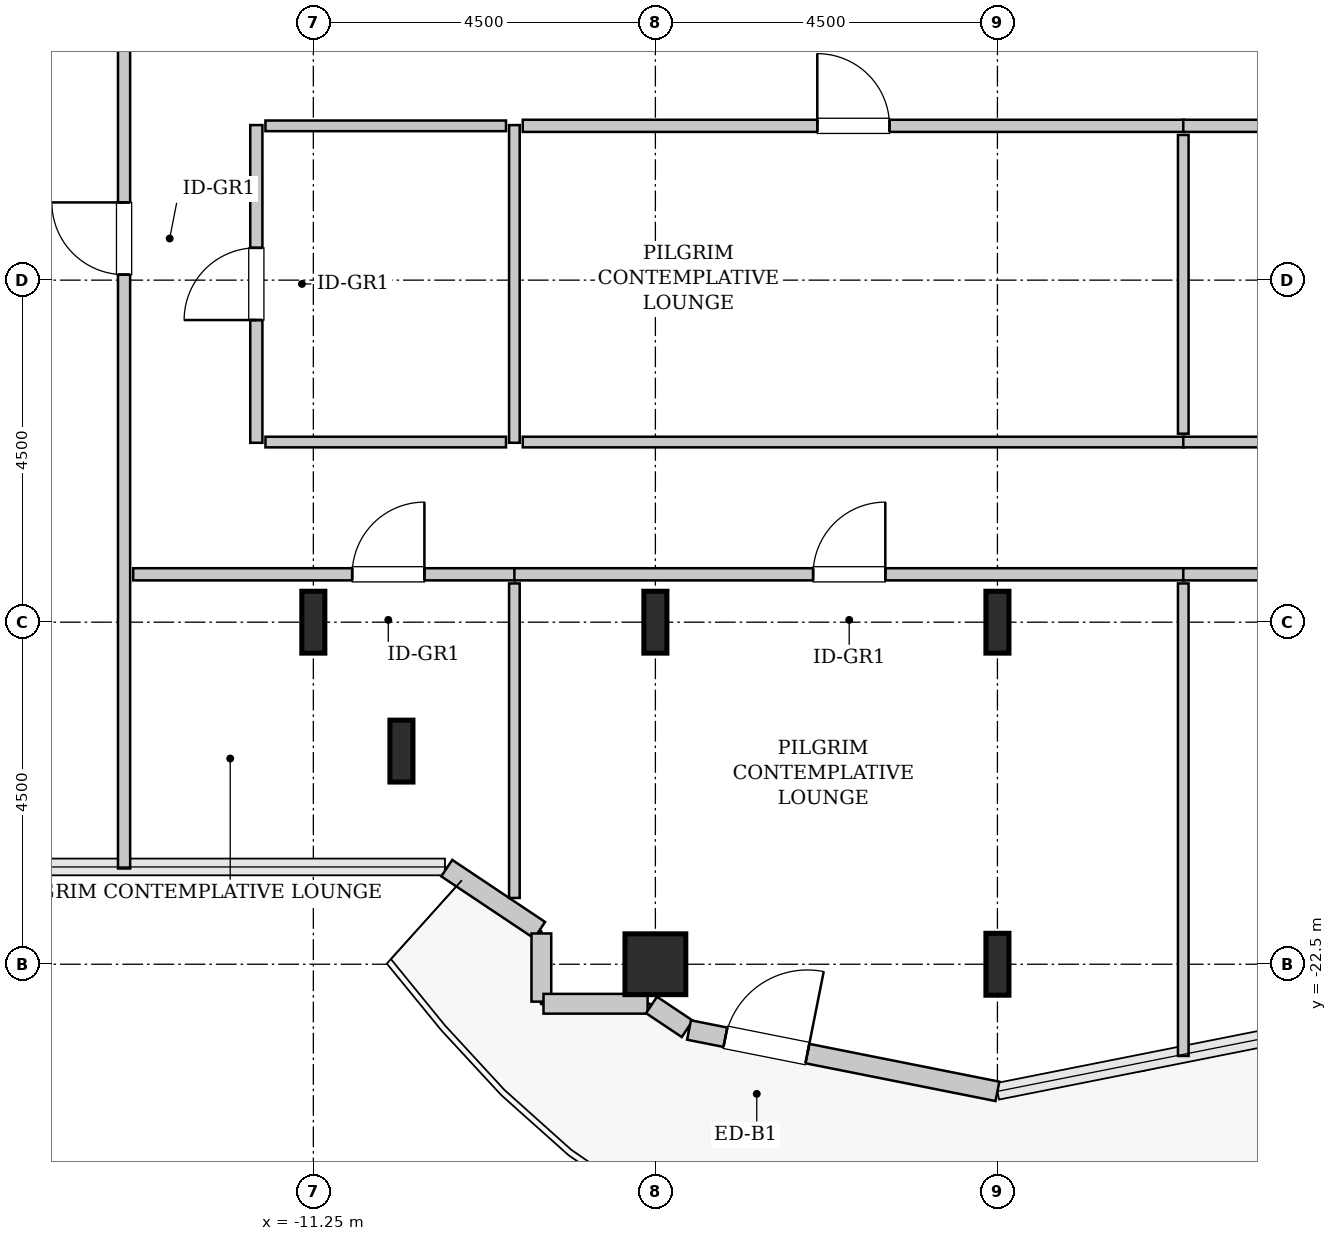
"""IFC4 building model, lengths in metres.
Left out: names, types, materials, properties, quantities, classifications, styles, units other than length and angle.
Written with IfcOpenShell. Run it as: python <this file> out.ifc"""

import sys

from ifc_helpers import new_model, si_unit, direction, frame, frame_2d, origin, origin_2d, place, context, subcontext, project, spatial, rectangle, hollow_rectangle, i_section, extrude, source, transform, mapped, element, fill, save


model = new_model("IFC4")
c1 = context("Model", 3, precision=1e-05, world=origin(), true_north=direction((0.0, 1.0)))
c2 = subcontext(c1, "Body", "Model", "MODEL_VIEW")
j1 = project(units=[si_unit("LENGTHUNIT", "METRE"), si_unit("PLANEANGLEUNIT", "RADIAN")], contexts=[c1])
p1 = place(None, origin())
s1 = spatial("IfcSite", under=j1, at=p1, CompositionType="ELEMENT")
p2 = place(p1, origin())
s2 = spatial("IfcBuilding", under=s1, at=p2, CompositionType="ELEMENT")
p3 = place(p2, frame((0.0, 0.0, 164.0)))
s3 = spatial("IfcBuildingStorey", under=s2, at=p3, CompositionType="ELEMENT", Elevation=164.0)
m1 = source(origin(), c2, "Body", "SweptSolid", [
    extrude(i_section(OverallWidth=0.303, OverallDepth=0.814, WebThickness=0.021, FlangeThickness=0.04, FilletRadius=0.03, at=origin_2d()), origin(), (0.0, 0.0, 1.0), 3.8),
])
for number, where, z_axis, x_axis in (
    (1, (-11.25, -18.0, 0.0), (0.0, 0.0, 1.0), (1.0, 0.0, 0.0)),
    (2, (-10.091, -19.696, 0.0), (0.0, 0.0, 1.0), (1.0, 0.0, 0.0)),
):
    element("IfcColumn", number, at=place(p3, frame(where, z_axis=z_axis, x_axis=x_axis)), inside=s3, PredefinedType="COLUMN", context=c2, shape_type="MappedRepresentation", body=[
        mapped(m1, transform((0.0, 0.0, 0.0), x_axis=(1.0, 0.0, 0.0), y_axis=(0.0, 1.0, 0.0), z_axis=(0.0, 0.0, 1.0), scale=1.0)),
    ])
m2 = source(origin(), c2, "Body", "SweptSolid", [
    extrude(hollow_rectangle(XDim=0.8, YDim=0.8, WallThickness=0.04, InnerFilletRadius=0.04, OuterFilletRadius=0.08, at=origin_2d()), origin(), (0.0, 0.0, 1.0), 3.8),
])
p4 = place(p3, frame((-6.75, -22.5, 0.0), z_axis=(0.0, 0.0, 1.0), x_axis=(1.0, 0.0, 0.0)))
e3 = element("IfcColumn", 3, at=p4, inside=s3, PredefinedType="COLUMN", context=c2, shape_type="MappedRepresentation", body=[
    mapped(m2, transform((0.0, 0.0, 0.0), x_axis=(1.0, 0.0, 0.0), y_axis=(0.0, 1.0, 0.0), z_axis=(0.0, 0.0, 1.0), scale=1.0)),
])
for number, where, z_axis, x_axis in (
    (4, (-6.75, -18.0, 0.0), (0.0, 0.0, 1.0), (1.0, 0.0, 0.0)),
    (5, (-2.25, -22.5, 0.0), (0.0, 0.0, 1.0), (1.0, 0.0, 0.0)),
    (6, (-2.25, -18.0, 0.0), (0.0, 0.0, 1.0), (1.0, 0.0, 0.0)),
):
    element("IfcColumn", number, at=place(p3, frame(where, z_axis=z_axis, x_axis=x_axis)), inside=s3, PredefinedType="COLUMN", context=c2, shape_type="MappedRepresentation", body=[
        mapped(m1, transform((0.0, 0.0, 0.0), x_axis=(1.0, 0.0, 0.0), y_axis=(0.0, 1.0, 0.0), z_axis=(0.0, 0.0, 1.0), scale=1.0)),
    ])
m3 = source(origin(), c2, "Body", "SweptSolid", [
    extrude(rectangle(XDim=1.469, YDim=0.26, at=frame_2d((0.734, 0.0))), origin(), (0.0, 0.0, 1.0), 3.55),
])
p5 = place(p3, frame((-9.495, -21.236, 0.0), z_axis=(0.0, 0.0, 1.0), x_axis=(0.831461760506, -0.555581983884, 0.0)))
e7 = element("IfcWall", 7, at=p5, inside=s3, PredefinedType="SOLIDWALL", context=c2, shape_type="MappedRepresentation", body=[
    mapped(m3, transform((0.0, 0.0, 0.0), x_axis=(1.0, 0.0, 0.0), y_axis=(0.0, 1.0, 0.0), z_axis=(0.0, 0.0, 1.0), scale=1.0)),
])
m4 = source(origin(), c2, "Body", "SweptSolid", [
    extrude(rectangle(XDim=0.897, YDim=0.26, at=frame_2d((0.448, 0.0))), origin(), (0.0, 0.0, 1.0), 3.55),
])
p6 = place(p3, frame((-8.25, -22.095, 0.0), z_axis=(0.0, 0.0, 1.0), x_axis=(0.0, -1.0, 0.0)))
e8 = element("IfcWall", 8, at=p6, inside=s3, PredefinedType="SOLIDWALL", context=c2, shape_type="MappedRepresentation", body=[
    mapped(m4, transform((0.0, 0.0, 0.0), x_axis=(1.0, 0.0, 0.0), y_axis=(0.0, 1.0, 0.0), z_axis=(0.0, 0.0, 1.0), scale=1.0)),
])
m5 = source(origin(), c2, "Body", "SweptSolid", [
    extrude(rectangle(XDim=1.37, YDim=0.26, at=frame_2d((0.685, 0.0))), origin(), (0.0, 0.0, 1.0), 3.55),
])
p7 = place(p3, frame((-8.222, -23.02, 0.0), z_axis=(0.0, 0.0, 1.0), x_axis=(1.0, 0.0, 0.0)))
e9 = element("IfcWall", 9, at=p7, inside=s3, PredefinedType="SOLIDWALL", context=c2, shape_type="MappedRepresentation", body=[
    mapped(m5, transform((0.0, 0.0, 0.0), x_axis=(1.0, 0.0, 0.0), y_axis=(0.0, 1.0, 0.0), z_axis=(0.0, 0.0, 1.0), scale=1.0)),
])
m6 = source(origin(), c2, "Body", "SweptSolid", [
    extrude(rectangle(XDim=0.565, YDim=0.26, at=frame_2d((0.283, 0.0))), origin(), (0.0, 0.0, 1.0), 3.55),
])
p8 = place(p3, frame((-6.801, -23.036, 0.0), z_axis=(0.0, 0.0, 1.0), x_axis=(0.831651492666, -0.555297933317, 0.0)))
e10 = element("IfcWall", 10, at=p8, inside=s3, PredefinedType="SOLIDWALL", context=c2, shape_type="MappedRepresentation", body=[
    mapped(m6, transform((0.0, 0.0, 0.0), x_axis=(1.0, 0.0, 0.0), y_axis=(0.0, 1.0, 0.0), z_axis=(0.0, 0.0, 1.0), scale=1.0)),
])
m7 = source(origin(), c2, "Body", "SweptSolid", [
    extrude(rectangle(XDim=4.137, YDim=0.26, at=frame_2d((2.068, 0.0))), origin(), (0.0, 0.0, 1.0), 3.55),
])
p9 = place(p3, frame((-6.307, -23.365, 0.0), z_axis=(0.0, 0.0, 1.0), x_axis=(0.980782170794, -0.195105954428, 0.0)))
e11 = element("IfcWall", 11, at=p9, inside=s3, PredefinedType="SOLIDWALL", context=c2, shape_type="MappedRepresentation", body=[
    mapped(m7, transform((0.0, 0.0, 0.0), x_axis=(1.0, 0.0, 0.0), y_axis=(0.0, 1.0, 0.0), z_axis=(0.0, 0.0, 1.0), scale=1.0)),
])
p10 = place(p9, frame((0.488, 0.0, 0.0)))
e12 = element("IfcOpeningElement", 12, at=p10, cuts=e11, PredefinedType="OPENING", context=c2, shape_type="SweptSolid", body=[
    extrude(rectangle(XDim=1.1, YDim=2.2, at=frame_2d((0.55, 1.1))), frame((0.0, 0.14, 0.0), z_axis=(0.0, -1.0, 0.0), x_axis=(1.0, 0.0, 0.0)), (0.0, 0.0, 1.0), 0.28),
])
m8 = source(origin(), c2, "Body", "SweptSolid", [
    extrude(rectangle(XDim=12.745, YDim=0.16, at=frame_2d((6.373, 0.0))), origin(), (0.0, 0.0, 1.0), 3.535),
])
p11 = place(p3, frame((-13.74, -21.24, 0.0), z_axis=(0.0, 0.0, 1.0), x_axis=(0.0, 1.0, 0.0)))
e13 = element("IfcWall", 13, at=p11, inside=s3, PredefinedType="PARTITIONING", context=c2, shape_type="MappedRepresentation", body=[
    mapped(m8, transform((0.0, 0.0, 0.0), x_axis=(1.0, 0.0, 0.0), y_axis=(0.0, 1.0, 0.0), z_axis=(0.0, 0.0, 1.0), scale=1.0)),
])
p12 = place(p11, frame((7.812, 0.0, 0.0)))
e14 = element("IfcOpeningElement", 14, at=p12, cuts=e13, PredefinedType="OPENING", context=c2, shape_type="SweptSolid", body=[
    extrude(rectangle(XDim=0.95, YDim=2.1, at=frame_2d((0.475, 1.05))), frame((0.0, 0.09, 0.0), z_axis=(0.0, -1.0, 0.0), x_axis=(1.0, 0.0, 0.0)), (0.0, 0.0, 1.0), 0.18),
])
m9 = source(origin(), c2, "Body", "SweptSolid", [
    extrude(rectangle(XDim=5.025, YDim=0.16, at=frame_2d((2.513, 0.0))), origin(), (0.0, 0.0, 1.0), 3.535),
])
p13 = place(p3, frame((-13.62, -17.37, 0.0), z_axis=(0.0, 0.0, 1.0), x_axis=(1.0, 0.0, 0.0)))
e15 = element("IfcWall", 15, at=p13, inside=s3, PredefinedType="PARTITIONING", context=c2, shape_type="MappedRepresentation", body=[
    mapped(m9, transform((0.0, 0.0, 0.0), x_axis=(1.0, 0.0, 0.0), y_axis=(0.0, 1.0, 0.0), z_axis=(0.0, 0.0, 1.0), scale=1.0)),
])
p14 = place(p13, frame((2.881, 0.0, 0.0)))
e16 = element("IfcOpeningElement", 16, at=p14, cuts=e15, PredefinedType="OPENING", context=c2, shape_type="SweptSolid", body=[
    extrude(rectangle(XDim=0.95, YDim=2.1, at=frame_2d((0.475, 1.05))), frame((0.0, 0.09, 0.0), z_axis=(0.0, -1.0, 0.0), x_axis=(1.0, 0.0, 0.0)), (0.0, 0.0, 1.0), 0.18),
])
m10 = source(origin(), c2, "Body", "SweptSolid", [
    extrude(rectangle(XDim=4.138, YDim=0.14, at=frame_2d((2.069, 0.0))), origin(), (0.0, 0.0, 1.0), 3.535),
])
p15 = place(p3, frame((-8.605, -21.628, 0.0), z_axis=(0.0, 0.0, 1.0), x_axis=(0.0, 1.0, 0.0)))
e17 = element("IfcWall", 17, at=p15, inside=s3, PredefinedType="PARTITIONING", context=c2, shape_type="MappedRepresentation", body=[
    mapped(m10, transform((0.0, 0.0, 0.0), x_axis=(1.0, 0.0, 0.0), y_axis=(0.0, 1.0, 0.0), z_axis=(0.0, 0.0, 1.0), scale=1.0)),
])
m11 = source(origin(), c2, "Body", "SweptSolid", [
    extrude(rectangle(XDim=4.18, YDim=0.16, at=frame_2d((2.09, 0.0))), origin(), (0.0, 0.0, 1.0), 3.535),
])
p16 = place(p3, frame((-12.0, -15.64, 0.0), z_axis=(0.0, 0.0, 1.0), x_axis=(0.0, 1.0, 0.0)))
e18 = element("IfcWall", 18, at=p16, inside=s3, PredefinedType="PARTITIONING", context=c2, shape_type="MappedRepresentation", body=[
    mapped(m11, transform((0.0, 0.0, 0.0), x_axis=(1.0, 0.0, 0.0), y_axis=(0.0, 1.0, 0.0), z_axis=(0.0, 0.0, 1.0), scale=1.0)),
])
p17 = place(p16, frame((1.615, 0.0, 0.0)))
e19 = element("IfcOpeningElement", 19, at=p17, cuts=e18, PredefinedType="OPENING", context=c2, shape_type="SweptSolid", body=[
    extrude(rectangle(XDim=0.95, YDim=2.1, at=frame_2d((0.475, 1.05))), frame((0.0, 0.09, 0.0), z_axis=(0.0, -1.0, 0.0), x_axis=(1.0, 0.0, 0.0)), (0.0, 0.0, 1.0), 0.18),
])
m12 = source(origin(), c2, "Body", "SweptSolid", [
    extrude(rectangle(XDim=4.18, YDim=0.14, at=frame_2d((2.09, 0.0))), origin(), (0.0, 0.0, 1.0), 3.535),
])
p18 = place(p3, frame((-8.605, -15.64, 0.0), z_axis=(0.0, 0.0, 1.0), x_axis=(0.0, 1.0, 0.0)))
e20 = element("IfcWall", 20, at=p18, inside=s3, PredefinedType="PARTITIONING", context=c2, shape_type="MappedRepresentation", body=[
    mapped(m12, transform((0.0, 0.0, 0.0), x_axis=(1.0, 0.0, 0.0), y_axis=(0.0, 1.0, 0.0), z_axis=(0.0, 0.0, 1.0), scale=1.0)),
])
m13 = source(origin(), c2, "Body", "SweptSolid", [
    extrude(rectangle(XDim=3.165, YDim=0.14, at=frame_2d((1.583, 0.0))), origin(), (0.0, 0.0, 1.0), 3.535),
])
for number, where, z_axis, x_axis in (
    (21, (-11.88, -11.47, 0.0), (0.0, 0.0, 1.0), (1.0, 0.0, 0.0)),
    (22, (-11.88, -15.63, 0.0), (0.0, 0.0, 1.0), (1.0, 0.0, 0.0)),
):
    element("IfcWall", number, at=place(p3, frame(where, z_axis=z_axis, x_axis=x_axis)), inside=s3, PredefinedType="PARTITIONING", context=c2, shape_type="MappedRepresentation", body=[
        mapped(m13, transform((0.0, 0.0, 0.0), x_axis=(1.0, 0.0, 0.0), y_axis=(0.0, 1.0, 0.0), z_axis=(0.0, 0.0, 1.0), scale=1.0)),
    ])
m14 = source(origin(), c2, "Body", "SweptSolid", [
    extrude(rectangle(XDim=8.81, YDim=0.16, at=frame_2d((4.405, 0.0))), origin(), (0.0, 0.0, 1.0), 3.535),
])
p19 = place(p3, frame((-8.605, -17.37, 0.0), z_axis=(0.0, 0.0, 1.0), x_axis=(1.0, 0.0, 0.0)))
e23 = element("IfcWall", 23, at=p19, inside=s3, PredefinedType="PARTITIONING", context=c2, shape_type="MappedRepresentation", body=[
    mapped(m14, transform((0.0, 0.0, 0.0), x_axis=(1.0, 0.0, 0.0), y_axis=(0.0, 1.0, 0.0), z_axis=(0.0, 0.0, 1.0), scale=1.0)),
])
p20 = place(p19, frame((3.93, 0.0, 0.0)))
e24 = element("IfcOpeningElement", 24, at=p20, cuts=e23, PredefinedType="OPENING", context=c2, shape_type="SweptSolid", body=[
    extrude(rectangle(XDim=0.95, YDim=2.1, at=frame_2d((0.475, 1.05))), frame((0.0, 0.09, 0.0), z_axis=(0.0, -1.0, 0.0), x_axis=(1.0, 0.0, 0.0)), (0.0, 0.0, 1.0), 0.18),
])
m15 = source(origin(), c2, "Body", "SweptSolid", [
    extrude(rectangle(XDim=6.216, YDim=0.14, at=frame_2d((3.108, 0.0))), origin(), (0.0, 0.0, 1.0), 3.535),
])
p21 = place(p3, frame((0.195, -23.706, 0.0), z_axis=(0.0, 0.0, 1.0), x_axis=(0.0, 1.0, 0.0)))
e25 = element("IfcWall", 25, at=p21, inside=s3, PredefinedType="PARTITIONING", context=c2, shape_type="MappedRepresentation", body=[
    mapped(m15, transform((0.0, 0.0, 0.0), x_axis=(1.0, 0.0, 0.0), y_axis=(0.0, 1.0, 0.0), z_axis=(0.0, 0.0, 1.0), scale=1.0)),
])
m16 = source(origin(), c2, "Body", "SweptSolid", [
    extrude(rectangle(XDim=8.7, YDim=0.16, at=frame_2d((4.35, 0.0))), origin(), (0.0, 0.0, 1.0), 3.535),
])
p22 = place(p3, frame((-8.495, -11.47, 0.0), z_axis=(0.0, 0.0, 1.0), x_axis=(1.0, 0.0, 0.0)))
e26 = element("IfcWall", 26, at=p22, inside=s3, PredefinedType="PARTITIONING", context=c2, shape_type="MappedRepresentation", body=[
    mapped(m16, transform((0.0, 0.0, 0.0), x_axis=(1.0, 0.0, 0.0), y_axis=(0.0, 1.0, 0.0), z_axis=(0.0, 0.0, 1.0), scale=1.0)),
])
p23 = place(p22, frame((3.875, 0.0, 0.0)))
e27 = element("IfcOpeningElement", 27, at=p23, cuts=e26, PredefinedType="OPENING", context=c2, shape_type="SweptSolid", body=[
    extrude(rectangle(XDim=0.95, YDim=2.1, at=frame_2d((0.475, 1.05))), frame((0.0, 0.09, 0.0), z_axis=(0.0, -1.0, 0.0), x_axis=(1.0, 0.0, 0.0)), (0.0, 0.0, 1.0), 0.18),
])
m17 = source(origin(), c2, "Body", "SweptSolid", [
    extrude(rectangle(XDim=8.7, YDim=0.14, at=frame_2d((4.35, 0.0))), origin(), (0.0, 0.0, 1.0), 3.535),
])
p24 = place(p3, frame((-8.495, -15.63, 0.0), z_axis=(0.0, 0.0, 1.0), x_axis=(1.0, 0.0, 0.0)))
e28 = element("IfcWall", 28, at=p24, inside=s3, PredefinedType="PARTITIONING", context=c2, shape_type="MappedRepresentation", body=[
    mapped(m17, transform((0.0, 0.0, 0.0), x_axis=(1.0, 0.0, 0.0), y_axis=(0.0, 1.0, 0.0), z_axis=(0.0, 0.0, 1.0), scale=1.0)),
])
m18 = source(origin(), c2, "Body", "SweptSolid", [
    extrude(rectangle(XDim=3.93, YDim=0.14, at=frame_2d((1.965, 0.0))), origin(), (0.0, 0.0, 1.0), 3.535),
])
p25 = place(p3, frame((0.195, -15.52, 0.0), z_axis=(0.0, 0.0, 1.0), x_axis=(0.0, 1.0, 0.0)))
e29 = element("IfcWall", 29, at=p25, inside=s3, PredefinedType="PARTITIONING", context=c2, shape_type="MappedRepresentation", body=[
    mapped(m18, transform((0.0, 0.0, 0.0), x_axis=(1.0, 0.0, 0.0), y_axis=(0.0, 1.0, 0.0), z_axis=(0.0, 0.0, 1.0), scale=1.0)),
])
m19 = source(origin(), c2, "Body", "SweptSolid", [
    extrude(rectangle(XDim=7.41, YDim=0.16, at=frame_2d((3.705, 0.0))), origin(), (0.0, 0.0, 1.0), 3.535),
])
p26 = place(p3, frame((0.195, -17.37, 0.0), z_axis=(0.0, 0.0, 1.0), x_axis=(1.0, 0.0, 0.0)))
e30 = element("IfcWall", 30, at=p26, inside=s3, PredefinedType="PARTITIONING", context=c2, shape_type="MappedRepresentation", body=[
    mapped(m19, transform((0.0, 0.0, 0.0), x_axis=(1.0, 0.0, 0.0), y_axis=(0.0, 1.0, 0.0), z_axis=(0.0, 0.0, 1.0), scale=1.0)),
])
p27 = place(p26, frame((3.23, 0.0, 0.0)))
e31 = element("IfcOpeningElement", 31, at=p27, cuts=e30, PredefinedType="OPENING", context=c2, shape_type="SweptSolid", body=[
    extrude(rectangle(XDim=0.95, YDim=2.1, at=frame_2d((0.475, 1.05))), frame((0.0, 0.09, 0.0), z_axis=(0.0, -1.0, 0.0), x_axis=(1.0, 0.0, 0.0)), (0.0, 0.0, 1.0), 0.18),
])
p28 = place(p3, frame((0.195, -11.47, 0.0), z_axis=(0.0, 0.0, 1.0), x_axis=(1.0, 0.0, 0.0)))
e32 = element("IfcWall", 32, at=p28, inside=s3, PredefinedType="PARTITIONING", context=c2, shape_type="MappedRepresentation", body=[
    mapped(m19, transform((0.0, 0.0, 0.0), x_axis=(1.0, 0.0, 0.0), y_axis=(0.0, 1.0, 0.0), z_axis=(0.0, 0.0, 1.0), scale=1.0)),
])
p29 = place(p28, frame((3.23, 0.0, 0.0)))
e33 = element("IfcOpeningElement", 33, at=p29, cuts=e32, PredefinedType="OPENING", context=c2, shape_type="SweptSolid", body=[
    extrude(rectangle(XDim=0.95, YDim=2.1, at=frame_2d((0.475, 1.05))), frame((0.0, 0.09, 0.0), z_axis=(0.0, -1.0, 0.0), x_axis=(1.0, 0.0, 0.0)), (0.0, 0.0, 1.0), 0.18),
])
m20 = source(origin(), c2, "Body", "SweptSolid", [
    extrude(rectangle(XDim=7.41, YDim=0.14, at=frame_2d((3.705, 0.0))), origin(), (0.0, 0.0, 1.0), 3.535),
])
p30 = place(p3, frame((0.195, -15.63, 0.0), z_axis=(0.0, 0.0, 1.0), x_axis=(1.0, 0.0, 0.0)))
e34 = element("IfcWall", 34, at=p30, inside=s3, PredefinedType="PARTITIONING", context=c2, shape_type="MappedRepresentation", body=[
    mapped(m20, transform((0.0, 0.0, 0.0), x_axis=(1.0, 0.0, 0.0), y_axis=(0.0, 1.0, 0.0), z_axis=(0.0, 0.0, 1.0), scale=1.0)),
])
m21 = source(origin(), c2, "Body", "SweptSolid", [
    extrude(rectangle(XDim=1.1, YDim=2.2, at=frame_2d((0.55, 1.1))), frame((0.0, 0.025, 0.0), z_axis=(0.0, -1.0, 0.0), x_axis=(1.0, 0.0, 0.0)), (0.0, 0.0, 1.0), 0.05),
])
p31 = place(p10, origin())
e35 = element("IfcDoor", 35, at=p31, inside=s3, OperationType="SINGLE_SWING_RIGHT", PredefinedType="DOOR", context=c2, shape_type="MappedRepresentation", body=[
    mapped(m21, transform((0.0, 0.0, 0.0), x_axis=(1.0, 0.0, 0.0), y_axis=(0.0, 1.0, 0.0), z_axis=(0.0, 0.0, 1.0), scale=1.0)),
])
fill(e12, e35)
m22 = source(origin(), c2, "Body", "SweptSolid", [
    extrude(rectangle(XDim=0.95, YDim=2.1, at=frame_2d((0.475, 1.05))), frame((0.0, 0.025, 0.0), z_axis=(0.0, -1.0, 0.0), x_axis=(1.0, 0.0, 0.0)), (0.0, 0.0, 1.0), 0.05),
])
p32 = place(p12, origin())
e36 = element("IfcDoor", 36, at=p32, inside=s3, OperationType="SINGLE_SWING_RIGHT", PredefinedType="DOOR", context=c2, shape_type="MappedRepresentation", body=[
    mapped(m22, transform((0.0, 0.0, 0.0), x_axis=(1.0, 0.0, 0.0), y_axis=(0.0, 1.0, 0.0), z_axis=(0.0, 0.0, 1.0), scale=1.0)),
])
fill(e14, e36)
p33 = place(p14, origin())
e37 = element("IfcDoor", 37, at=p33, inside=s3, OperationType="SINGLE_SWING_RIGHT", PredefinedType="DOOR", context=c2, shape_type="MappedRepresentation", body=[
    mapped(m22, transform((0.0, 0.0, 0.0), x_axis=(1.0, 0.0, 0.0), y_axis=(0.0, 1.0, 0.0), z_axis=(0.0, 0.0, 1.0), scale=1.0)),
])
fill(e16, e37)
p34 = place(p17, origin())
e38 = element("IfcDoor", 38, at=p34, inside=s3, OperationType="SINGLE_SWING_LEFT", PredefinedType="DOOR", context=c2, shape_type="MappedRepresentation", body=[
    mapped(m22, transform((0.0, 0.0, 0.0), x_axis=(1.0, 0.0, 0.0), y_axis=(0.0, 1.0, 0.0), z_axis=(0.0, 0.0, 1.0), scale=1.0)),
])
fill(e19, e38)
p35 = place(p20, origin())
e39 = element("IfcDoor", 39, at=p35, inside=s3, OperationType="SINGLE_SWING_RIGHT", PredefinedType="DOOR", context=c2, shape_type="MappedRepresentation", body=[
    mapped(m22, transform((0.0, 0.0, 0.0), x_axis=(1.0, 0.0, 0.0), y_axis=(0.0, 1.0, 0.0), z_axis=(0.0, 0.0, 1.0), scale=1.0)),
])
fill(e24, e39)
p36 = place(p23, origin())
e40 = element("IfcDoor", 40, at=p36, inside=s3, OperationType="SINGLE_SWING_LEFT", PredefinedType="DOOR", context=c2, shape_type="MappedRepresentation", body=[
    mapped(m22, transform((0.0, 0.0, 0.0), x_axis=(1.0, 0.0, 0.0), y_axis=(0.0, 1.0, 0.0), z_axis=(0.0, 0.0, 1.0), scale=1.0)),
])
fill(e27, e40)
save(model, sys.argv[1])
